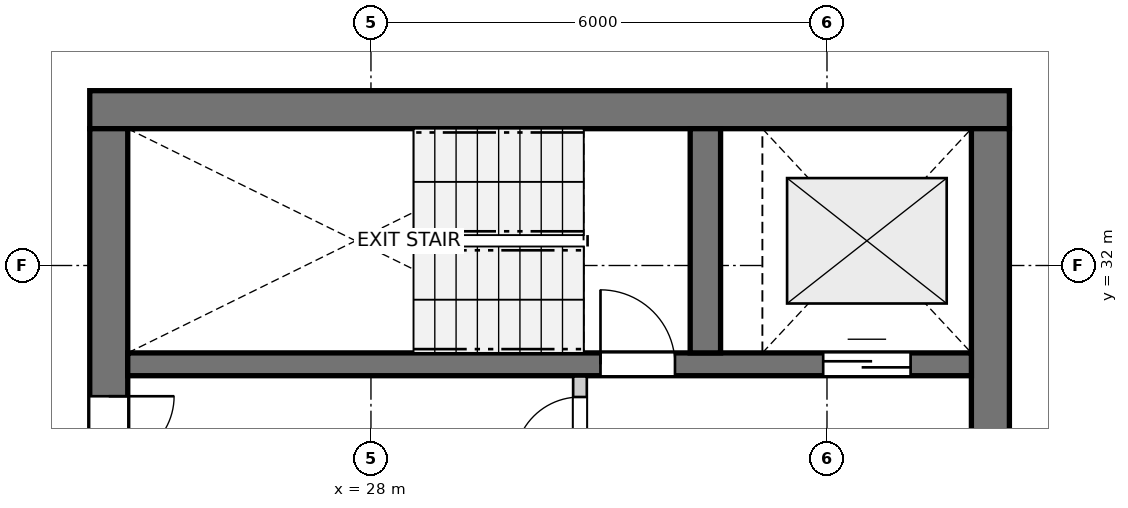
"""IFC4 building model, lengths in metres.
Left out: names, types, materials, properties, quantities, classifications, styles, units other than length and angle.
Written with IfcOpenShell. Run it as: python <this file> out.ifc"""

import sys

from ifc_helpers import new_model, si_unit, direction, frame, frame_2d, origin, place, context, subcontext, project, spatial, rectangle, extrude, source, transform, mapped, element, fill, save


model = new_model("IFC4")
c1 = context("Model", 3, precision=1e-05, world=origin(), true_north=direction((0.0, 1.0)))
c2 = subcontext(c1, "Body", "Model", "MODEL_VIEW")
j1 = project(units=[si_unit("LENGTHUNIT", "METRE"), si_unit("PLANEANGLEUNIT", "RADIAN")], contexts=[c1])
p1 = place(None, origin())
s1 = spatial("IfcSite", under=j1, at=p1, CompositionType="ELEMENT")
p2 = place(p1, origin())
s2 = spatial("IfcBuilding", under=s1, at=p2, CompositionType="ELEMENT")
p3 = place(p2, frame((0.0, 0.0, 195.6)))
s3 = spatial("IfcBuildingStorey", under=s2, at=p3, CompositionType="ELEMENT", Elevation=195.6)
p4 = place(p3, frame((36.4, 34.05, 0.0), z_axis=(0.0, 0.0, 1.0), x_axis=(-1.0, 0.0, 0.0)))
e1 = element("IfcWall", 1, at=p4, inside=s3, PredefinedType="SHEAR", context=c2, shape_type="SweptSolid", body=[
    extrude(rectangle(XDim=12.1, YDim=0.5, at=frame_2d((6.05, 0.0))), origin(), (0.0, 0.0, 1.0), 2.96),
])
p5 = place(p3, frame((24.55, 33.8, 0.0), z_axis=(0.0, 0.0, 1.0), x_axis=(0.0, -1.0, 0.0)))
e2 = element("IfcWall", 2, at=p5, inside=s3, PredefinedType="SHEAR", context=c2, shape_type="SweptSolid", body=[
    extrude(rectangle(XDim=15.6, YDim=0.5, at=frame_2d((7.8, 0.0))), origin(), (0.0, 0.0, 1.0), 2.96),
])
p6 = place(p5, frame((7.05, 0.0, 0.0)))
e3 = element("IfcOpeningElement", 3, at=p6, cuts=e2, PredefinedType="OPENING", context=c2, shape_type="SweptSolid", body=[
    extrude(rectangle(XDim=1.5, YDim=2.15, at=frame_2d((0.75, 1.075))), frame((0.0, 0.26, 0.0), z_axis=(0.0, -1.0, 0.0), x_axis=(1.0, 0.0, 0.0)), (0.0, 0.0, 1.0), 0.52),
])
p7 = place(p5, frame((3.52, 0.0, 0.0)))
e4 = element("IfcOpeningElement", 4, at=p7, cuts=e2, PredefinedType="OPENING", context=c2, shape_type="SweptSolid", body=[
    extrude(rectangle(XDim=0.86, YDim=2.05, at=frame_2d((0.43, 1.025))), frame((0.0, 0.26, 0.0), z_axis=(0.0, -1.0, 0.0), x_axis=(1.0, 0.0, 0.0)), (0.0, 0.0, 1.0), 0.52),
])
p8 = place(p5, frame((11.22, 0.0, 0.0)))
e5 = element("IfcOpeningElement", 5, at=p8, cuts=e2, PredefinedType="OPENING", context=c2, shape_type="SweptSolid", body=[
    extrude(rectangle(XDim=0.86, YDim=2.05, at=frame_2d((0.43, 1.025))), frame((0.0, 0.26, 0.0), z_axis=(0.0, -1.0, 0.0), x_axis=(1.0, 0.0, 0.0)), (0.0, 0.0, 1.0), 0.52),
])
p9 = place(p3, frame((36.15, 18.2, 0.0), z_axis=(0.0, 0.0, 1.0), x_axis=(0.0, 1.0, 0.0)))
e6 = element("IfcWall", 6, at=p9, inside=s3, PredefinedType="SHEAR", context=c2, shape_type="SweptSolid", body=[
    extrude(rectangle(XDim=15.6, YDim=0.5, at=frame_2d((7.8, 0.0))), origin(), (0.0, 0.0, 1.0), 2.96),
])
p10 = place(p9, frame((4.25, 0.0, 0.0)))
e7 = element("IfcOpeningElement", 7, at=p10, cuts=e6, PredefinedType="OPENING", context=c2, shape_type="SweptSolid", body=[
    extrude(rectangle(XDim=1.1, YDim=2.15, at=frame_2d((0.55, 1.075))), frame((0.0, 0.26, 0.0), z_axis=(0.0, -1.0, 0.0), x_axis=(1.0, 0.0, 0.0)), (0.0, 0.0, 1.0), 0.52),
])
p11 = place(p9, frame((10.25, 0.0, 0.0)))
e8 = element("IfcOpeningElement", 8, at=p11, cuts=e6, PredefinedType="OPENING", context=c2, shape_type="SweptSolid", body=[
    extrude(rectangle(XDim=1.1, YDim=2.15, at=frame_2d((0.55, 1.075))), frame((0.0, 0.26, 0.0), z_axis=(0.0, -1.0, 0.0), x_axis=(1.0, 0.0, 0.0)), (0.0, 0.0, 1.0), 0.52),
])
p12 = place(p3, frame((24.8, 30.7, 0.0), z_axis=(0.0, 0.0, 1.0), x_axis=(1.0, 0.0, 0.0)))
e9 = element("IfcWall", 9, at=p12, inside=s3, PredefinedType="SHEAR", context=c2, shape_type="SweptSolid", body=[
    extrude(rectangle(XDim=11.1, YDim=0.3, at=frame_2d((5.55, 0.0))), origin(), (0.0, 0.0, 1.0), 2.96),
])
p13 = place(p12, frame((6.22, 0.0, 0.0)))
e10 = element("IfcOpeningElement", 10, at=p13, cuts=e9, PredefinedType="OPENING", context=c2, shape_type="SweptSolid", body=[
    extrude(rectangle(XDim=0.98, YDim=2.15, at=frame_2d((0.49, 1.075))), frame((0.0, 0.16, 0.0), z_axis=(0.0, -1.0, 0.0), x_axis=(1.0, 0.0, 0.0)), (0.0, 0.0, 1.0), 0.32),
])
p14 = place(p12, frame((9.15, 0.0, 0.0)))
e11 = element("IfcOpeningElement", 11, at=p14, cuts=e9, PredefinedType="OPENING", context=c2, shape_type="SweptSolid", body=[
    extrude(rectangle(XDim=1.15, YDim=2.15, at=frame_2d((0.575, 1.075))), frame((0.0, 0.16, 0.0), z_axis=(0.0, -1.0, 0.0), x_axis=(1.0, 0.0, 0.0)), (0.0, 0.0, 1.0), 0.32),
])
p15 = place(p3, frame((32.4, 30.85, 0.0), z_axis=(0.0, 0.0, 1.0), x_axis=(0.0, 1.0, 0.0)))
e12 = element("IfcWall", 12, at=p15, inside=s3, PredefinedType="SHEAR", context=c2, shape_type="SweptSolid", body=[
    extrude(rectangle(XDim=2.95, YDim=0.4, at=frame_2d((1.475, 0.0))), origin(), (0.0, 0.0, 1.0), 2.96),
])
p16 = place(p3, frame((30.75, 27.43, 0.0), z_axis=(0.0, 0.0, 1.0), x_axis=(0.0, 1.0, 0.0)))
e13 = element("IfcWall", 13, at=p16, inside=s3, PredefinedType="PARTITIONING", context=c2, shape_type="SweptSolid", body=[
    extrude(rectangle(XDim=3.11, YDim=0.18, at=frame_2d((1.555, 0.0))), origin(), (0.0, 0.0, 1.0), 2.96),
])
p17 = place(p16, frame((1.98, 0.0, 0.0)))
e14 = element("IfcOpeningElement", 14, at=p17, cuts=e13, PredefinedType="OPENING", context=c2, shape_type="SweptSolid", body=[
    extrude(rectangle(XDim=0.86, YDim=2.05, at=frame_2d((0.43, 1.025))), frame((0.0, 0.1, 0.0), z_axis=(0.0, -1.0, 0.0), x_axis=(1.0, 0.0, 0.0)), (0.0, 0.0, 1.0), 0.2),
])
m1 = source(origin(), c2, "Body", "SweptSolid", [
    extrude(rectangle(XDim=0.98, YDim=2.15, at=frame_2d((0.49, 1.075))), frame((0.0, 0.025, 0.0), z_axis=(0.0, -1.0, 0.0), x_axis=(1.0, 0.0, 0.0)), (0.0, 0.0, 1.0), 0.05),
])
p18 = place(p13, origin())
e15 = element("IfcDoor", 15, at=p18, inside=s3, OperationType="SINGLE_SWING_LEFT", PredefinedType="DOOR", context=c2, shape_type="MappedRepresentation", body=[
    mapped(m1, transform((0.0, 0.0, 0.0), x_axis=(1.0, 0.0, 0.0), y_axis=(0.0, 1.0, 0.0), z_axis=(0.0, 0.0, 1.0), scale=1.0)),
])
fill(e10, e15)
m2 = source(origin(), c2, "Body", "SweptSolid", [
    extrude(rectangle(XDim=1.15, YDim=2.15, at=frame_2d((0.575, 1.075))), frame((0.0, 0.025, 0.0), z_axis=(0.0, -1.0, 0.0), x_axis=(1.0, 0.0, 0.0)), (0.0, 0.0, 1.0), 0.05),
])
p19 = place(p14, origin())
e16 = element("IfcDoor", 16, at=p19, inside=s3, OperationType="DOUBLE_DOOR_SLIDING", PredefinedType="DOOR", context=c2, shape_type="MappedRepresentation", body=[
    mapped(m2, transform((0.0, 0.0, 0.0), x_axis=(1.0, 0.0, 0.0), y_axis=(0.0, 1.0, 0.0), z_axis=(0.0, 0.0, 1.0), scale=1.0)),
])
fill(e11, e16)
m3 = source(origin(), c2, "Body", "SweptSolid", [
    extrude(rectangle(XDim=0.86, YDim=2.05, at=frame_2d((0.43, 1.025))), frame((0.0, 0.025, 0.0), z_axis=(0.0, -1.0, 0.0), x_axis=(1.0, 0.0, 0.0)), (0.0, 0.0, 1.0), 0.05),
])
p20 = place(p7, origin())
e17 = element("IfcDoor", 17, at=p20, inside=s3, OperationType="SINGLE_SWING_LEFT", PredefinedType="DOOR", context=c2, shape_type="MappedRepresentation", body=[
    mapped(m3, transform((0.0, 0.0, 0.0), x_axis=(1.0, 0.0, 0.0), y_axis=(0.0, 1.0, 0.0), z_axis=(0.0, 0.0, 1.0), scale=1.0)),
])
fill(e4, e17)
p21 = place(p17, origin())
e18 = element("IfcDoor", 18, at=p21, inside=s3, OperationType="SINGLE_SWING_LEFT", PredefinedType="DOOR", context=c2, shape_type="MappedRepresentation", body=[
    mapped(m3, transform((0.0, 0.0, 0.0), x_axis=(1.0, 0.0, 0.0), y_axis=(0.0, 1.0, 0.0), z_axis=(0.0, 0.0, 1.0), scale=1.0)),
])
fill(e14, e18)
save(model, sys.argv[1])
